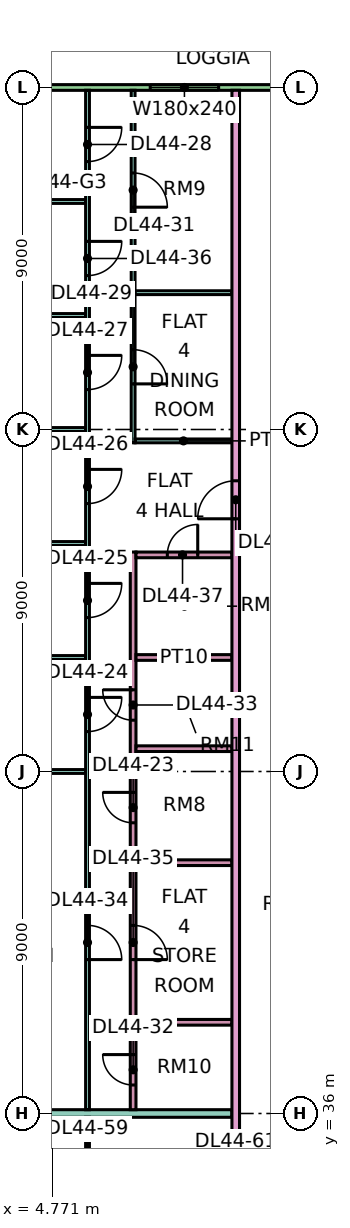
"""IFC4 building model, lengths in metres.
Left out: names, types, materials, properties, quantities, classifications, styles, units other than length and angle.
Written with IfcOpenShell. Run it as: python <this file> out.ifc"""

import sys

from ifc_helpers import new_model, si_unit, direction, frame, frame_2d, origin, place, context, subcontext, project, spatial, rectangle, extrude, element, fill, save


model = new_model("IFC4")
c1 = context("Model", 3, precision=1e-05, world=origin(), true_north=direction((0.0, 1.0)))
c2 = subcontext(c1, "Body", "Model", "MODEL_VIEW")
j1 = project(units=[si_unit("LENGTHUNIT", "METRE"), si_unit("PLANEANGLEUNIT", "RADIAN")], contexts=[c1])
p1 = place(None, origin())
s1 = spatial("IfcSite", under=j1, at=p1, CompositionType="ELEMENT")
p2 = place(p1, origin())
s2 = spatial("IfcBuilding", under=s1, at=p2, CompositionType="ELEMENT")
p3 = place(p2, frame((0.0, 0.0, 191.15)))
s3 = spatial("IfcBuildingStorey", under=s2, at=p3, CompositionType="ELEMENT", Elevation=191.15)
p4 = place(p3, frame((11.925, 63.0, 0.0), z_axis=(0.0, 0.0, 1.0), x_axis=(-1.0, 0.0, 0.0)))
e1 = element("IfcWall", 1, at=p4, inside=s3, PredefinedType="SOLIDWALL", context=c2, shape_type="SweptSolid", body=[
    extrude(rectangle(XDim=10.35, YDim=0.15, at=frame_2d((5.175, 0.0))), origin(), (0.0, 0.0, 1.0), 3.35),
])
p5 = place(p4, frame((2.775, 0.0, 0.45)))
e2 = element("IfcOpeningElement", 2, at=p5, cuts=e1, PredefinedType="OPENING", context=c2, shape_type="SweptSolid", body=[
    extrude(rectangle(XDim=1.8, YDim=2.4, at=frame_2d((0.9, 1.2))), frame((0.0, 0.085, 0.0), z_axis=(0.0, -1.0, 0.0), x_axis=(1.0, 0.0, 0.0)), (0.0, 0.0, 1.0), 0.17),
])
p6 = place(p4, frame((7.387, 0.0, 0.0)))
e3 = element("IfcOpeningElement", 3, at=p6, cuts=e1, PredefinedType="OPENING", context=c2, shape_type="SweptSolid", body=[
    extrude(rectangle(XDim=1.8, YDim=2.4, at=frame_2d((0.9, 1.2))), frame((0.0, 0.085, 0.0), z_axis=(0.0, -1.0, 0.0), x_axis=(1.0, 0.0, 0.0)), (0.0, 0.0, 1.0), 0.17),
])
p7 = place(p3, frame((0.0, 36.0, 0.0), z_axis=(0.0, 0.0, 1.0), x_axis=(1.0, 0.0, 0.0)))
e4 = element("IfcWall", 4, at=p7, inside=s3, PredefinedType="PARTITIONING", context=c2, shape_type="SweptSolid", body=[
    extrude(rectangle(XDim=9.5, YDim=0.2, at=frame_2d((4.75, 0.0))), origin(), (0.0, 0.0, 1.0), 3.35),
])
p8 = place(p3, frame((0.0, 45.0, 0.0), z_axis=(0.0, 0.0, 1.0), x_axis=(1.0, 0.0, 0.0)))
e5 = element("IfcWall", 5, at=p8, inside=s3, PredefinedType="PARTITIONING", context=c2, shape_type="SweptSolid", body=[
    extrude(rectangle(XDim=5.65, YDim=0.1, at=frame_2d((2.825, 0.0))), origin(), (0.0, 0.0, 1.0), 3.35),
])
p9 = place(p3, frame((0.0, 48.0, 0.0), z_axis=(0.0, 0.0, 1.0), x_axis=(1.0, 0.0, 0.0)))
e6 = element("IfcWall", 6, at=p9, inside=s3, PredefinedType="PARTITIONING", context=c2, shape_type="SweptSolid", body=[
    extrude(rectangle(XDim=5.65, YDim=0.1, at=frame_2d((2.825, 0.0))), origin(), (0.0, 0.0, 1.0), 3.35),
])
for number, where, z_axis, x_axis in (
    (7, (0.074, 51.0, 0.0), (0.0, 0.0, 1.0), (1.0, 0.0, 0.0)),
    (8, (0.074, 54.0, 0.0), (0.0, 0.0, 1.0), (1.0, 0.0, 0.0)),
    (9, (0.074, 57.0, 0.0), (0.0, 0.0, 1.0), (1.0, 0.0, 0.0)),
    (10, (0.074, 60.0, 0.0), (0.0, 0.0, 1.0), (1.0, 0.0, 0.0)),
):
    element("IfcWall", number, at=place(p3, frame(where, z_axis=z_axis, x_axis=x_axis)), inside=s3, PredefinedType="PARTITIONING", context=c2, shape_type="SweptSolid", body=[
        extrude(rectangle(XDim=5.576, YDim=0.1, at=frame_2d((2.788, 0.0))), origin(), (0.0, 0.0, 1.0), 3.35),
    ])
p10 = place(p3, frame((5.7, 29.95, 0.0), z_axis=(0.0, 0.0, 1.0), x_axis=(0.0, 1.0, 0.0)))
e11 = element("IfcWall", 11, at=p10, inside=s3, PredefinedType="PARTITIONING", context=c2, shape_type="SweptSolid", body=[
    extrude(rectangle(XDim=5.95, YDim=0.1, at=frame_2d((2.975, 0.0))), origin(), (0.0, 0.0, 1.0), 3.35),
])
p11 = place(p10, frame((1.1, 0.0, 0.0)))
e12 = element("IfcOpeningElement", 12, at=p11, cuts=e11, PredefinedType="OPENING", context=c2, shape_type="SweptSolid", body=[
    extrude(rectangle(XDim=0.9, YDim=2.1, at=frame_2d((0.45, 1.05))), frame((0.0, 0.06, 0.0), z_axis=(0.0, -1.0, 0.0), x_axis=(1.0, 0.0, 0.0)), (0.0, 0.0, 1.0), 0.12),
])
p12 = place(p10, frame((4.1, 0.0, 0.0)))
e13 = element("IfcOpeningElement", 13, at=p12, cuts=e11, PredefinedType="OPENING", context=c2, shape_type="SweptSolid", body=[
    extrude(rectangle(XDim=0.9, YDim=2.1, at=frame_2d((0.45, 1.05))), frame((0.0, 0.06, 0.0), z_axis=(0.0, -1.0, 0.0), x_axis=(1.0, 0.0, 0.0)), (0.0, 0.0, 1.0), 0.12),
])
p13 = place(p3, frame((5.7, 36.1, 0.0), z_axis=(0.0, 0.0, 1.0), x_axis=(0.0, 1.0, 0.0)))
e14 = element("IfcWall", 14, at=p13, inside=s3, PredefinedType="PARTITIONING", context=c2, shape_type="SweptSolid", body=[
    extrude(rectangle(XDim=26.826, YDim=0.1, at=frame_2d((13.413, 0.0))), origin(), (0.0, 0.0, 1.0), 3.35),
])
p14 = place(p13, frame((9.95, 0.0, 0.0)))
e15 = element("IfcOpeningElement", 15, at=p14, cuts=e14, PredefinedType="OPENING", context=c2, shape_type="SweptSolid", body=[
    extrude(rectangle(XDim=0.9, YDim=2.1, at=frame_2d((0.45, 1.05))), frame((0.0, 0.06, 0.0), z_axis=(0.0, -1.0, 0.0), x_axis=(1.0, 0.0, 0.0)), (0.0, 0.0, 1.0), 0.12),
])
p15 = place(p13, frame((12.95, 0.0, 0.0)))
e16 = element("IfcOpeningElement", 16, at=p15, cuts=e14, PredefinedType="OPENING", context=c2, shape_type="SweptSolid", body=[
    extrude(rectangle(XDim=0.9, YDim=2.1, at=frame_2d((0.45, 1.05))), frame((0.0, 0.06, 0.0), z_axis=(0.0, -1.0, 0.0), x_axis=(1.0, 0.0, 0.0)), (0.0, 0.0, 1.0), 0.12),
])
p16 = place(p13, frame((15.95, 0.0, 0.0)))
e17 = element("IfcOpeningElement", 17, at=p16, cuts=e14, PredefinedType="OPENING", context=c2, shape_type="SweptSolid", body=[
    extrude(rectangle(XDim=0.9, YDim=2.1, at=frame_2d((0.45, 1.05))), frame((0.0, 0.06, 0.0), z_axis=(0.0, -1.0, 0.0), x_axis=(1.0, 0.0, 0.0)), (0.0, 0.0, 1.0), 0.12),
])
p17 = place(p13, frame((18.95, 0.0, 0.0)))
e18 = element("IfcOpeningElement", 18, at=p17, cuts=e14, PredefinedType="OPENING", context=c2, shape_type="SweptSolid", body=[
    extrude(rectangle(XDim=0.9, YDim=2.1, at=frame_2d((0.45, 1.05))), frame((0.0, 0.06, 0.0), z_axis=(0.0, -1.0, 0.0), x_axis=(1.0, 0.0, 0.0)), (0.0, 0.0, 1.0), 0.12),
])
p18 = place(p13, frame((24.95, 0.0, 0.0)))
e19 = element("IfcOpeningElement", 19, at=p18, cuts=e14, PredefinedType="OPENING", context=c2, shape_type="SweptSolid", body=[
    extrude(rectangle(XDim=0.9, YDim=2.1, at=frame_2d((0.45, 1.05))), frame((0.0, 0.06, 0.0), z_axis=(0.0, -1.0, 0.0), x_axis=(1.0, 0.0, 0.0)), (0.0, 0.0, 1.0), 0.12),
])
p19 = place(p13, frame((3.95, 0.0, 0.0)))
e20 = element("IfcOpeningElement", 20, at=p19, cuts=e14, PredefinedType="OPENING", context=c2, shape_type="SweptSolid", body=[
    extrude(rectangle(XDim=0.9, YDim=2.1, at=frame_2d((0.45, 1.05))), frame((0.0, 0.06, 0.0), z_axis=(0.0, -1.0, 0.0), x_axis=(1.0, 0.0, 0.0)), (0.0, 0.0, 1.0), 0.12),
])
p20 = place(p13, frame((21.95, 0.0, 0.0)))
e21 = element("IfcOpeningElement", 21, at=p20, cuts=e14, PredefinedType="OPENING", context=c2, shape_type="SweptSolid", body=[
    extrude(rectangle(XDim=0.9, YDim=2.1, at=frame_2d((0.45, 1.05))), frame((0.0, 0.06, 0.0), z_axis=(0.0, -1.0, 0.0), x_axis=(1.0, 0.0, 0.0)), (0.0, 0.0, 1.0), 0.12),
])
p21 = place(p3, frame((6.9, 36.1, 0.0), z_axis=(0.0, 0.0, 1.0), x_axis=(0.0, 1.0, 0.0)))
e22 = element("IfcWall", 22, at=p21, inside=s3, PredefinedType="PARTITIONING", context=c2, shape_type="SweptSolid", body=[
    extrude(rectangle(XDim=14.675, YDim=0.15, at=frame_2d((7.337, 0.0))), origin(), (0.0, 0.0, 1.0), 3.35),
])
p22 = place(p21, frame((7.55, 0.0, 0.0)))
e23 = element("IfcOpeningElement", 23, at=p22, cuts=e22, PredefinedType="OPENING", context=c2, shape_type="SweptSolid", body=[
    extrude(rectangle(XDim=0.8, YDim=2.1, at=frame_2d((0.4, 1.05))), frame((0.0, 0.085, 0.0), z_axis=(0.0, -1.0, 0.0), x_axis=(1.0, 0.0, 0.0)), (0.0, 0.0, 1.0), 0.17),
])
p23 = place(p21, frame((0.65, 0.0, 0.0)))
e24 = element("IfcOpeningElement", 24, at=p23, cuts=e22, PredefinedType="OPENING", context=c2, shape_type="SweptSolid", body=[
    extrude(rectangle(XDim=0.8, YDim=2.1, at=frame_2d((0.4, 1.05))), frame((0.0, 0.085, 0.0), z_axis=(0.0, -1.0, 0.0), x_axis=(1.0, 0.0, 0.0)), (0.0, 0.0, 1.0), 0.17),
])
p24 = place(p21, frame((10.25, 0.0, 0.0)))
e25 = element("IfcOpeningElement", 25, at=p24, cuts=e22, PredefinedType="OPENING", context=c2, shape_type="SweptSolid", body=[
    extrude(rectangle(XDim=0.8, YDim=2.1, at=frame_2d((0.4, 1.05))), frame((0.0, 0.085, 0.0), z_axis=(0.0, -1.0, 0.0), x_axis=(1.0, 0.0, 0.0)), (0.0, 0.0, 1.0), 0.17),
])
p25 = place(p21, frame((3.95, 0.0, 0.0)))
e26 = element("IfcOpeningElement", 26, at=p25, cuts=e22, PredefinedType="OPENING", context=c2, shape_type="SweptSolid", body=[
    extrude(rectangle(XDim=0.9, YDim=2.1, at=frame_2d((0.45, 1.05))), frame((0.0, 0.085, 0.0), z_axis=(0.0, -1.0, 0.0), x_axis=(1.0, 0.0, 0.0)), (0.0, 0.0, 1.0), 0.17),
])
p26 = place(p3, frame((6.9, 53.65, 0.0), z_axis=(0.0, 0.0, 1.0), x_axis=(0.0, 1.0, 0.0)))
e27 = element("IfcWall", 27, at=p26, inside=s3, PredefinedType="PARTITIONING", context=c2, shape_type="SweptSolid", body=[
    extrude(rectangle(XDim=9.276, YDim=0.1, at=frame_2d((4.638, 0.0))), origin(), (0.0, 0.0, 1.0), 3.35),
])
p27 = place(p26, frame((1.55, 0.0, 0.0)))
e28 = element("IfcOpeningElement", 28, at=p27, cuts=e27, PredefinedType="OPENING", context=c2, shape_type="SweptSolid", body=[
    extrude(rectangle(XDim=0.9, YDim=2.1, at=frame_2d((0.45, 1.05))), frame((0.0, 0.06, 0.0), z_axis=(0.0, -1.0, 0.0), x_axis=(1.0, 0.0, 0.0)), (0.0, 0.0, 1.0), 0.12),
])
p28 = place(p26, frame((6.2, 0.0, 0.0)))
e29 = element("IfcOpeningElement", 29, at=p28, cuts=e27, PredefinedType="OPENING", context=c2, shape_type="SweptSolid", body=[
    extrude(rectangle(XDim=0.9, YDim=2.1, at=frame_2d((0.45, 1.05))), frame((0.0, 0.06, 0.0), z_axis=(0.0, -1.0, 0.0), x_axis=(1.0, 0.0, 0.0)), (0.0, 0.0, 1.0), 0.12),
])
for number, where, z_axis, x_axis in (
    (30, (6.95, 53.7, 0.0), (0.0, 0.0, 1.0), (1.0, 0.0, 0.0)),
    (31, (6.95, 57.6, 0.0), (0.0, 0.0, 1.0), (1.0, 0.0, 0.0)),
):
    element("IfcWall", number, at=place(p3, frame(where, z_axis=z_axis, x_axis=x_axis)), inside=s3, PredefinedType="PARTITIONING", context=c2, shape_type="SweptSolid", body=[
        extrude(rectangle(XDim=2.55, YDim=0.1, at=frame_2d((1.275, 0.0))), origin(), (0.0, 0.0, 1.0), 3.35),
    ])
for number, where, z_axis, x_axis in (
    (32, (6.975, 38.4, 0.0), (0.0, 0.0, 1.0), (1.0, 0.0, 0.0)),
    (33, (6.975, 42.6, 0.0), (0.0, 0.0, 1.0), (1.0, 0.0, 0.0)),
    (34, (6.975, 45.6, 0.0), (0.0, 0.0, 1.0), (1.0, 0.0, 0.0)),
    (35, (6.975, 48.0, 0.0), (0.0, 0.0, 1.0), (1.0, 0.0, 0.0)),
):
    element("IfcWall", number, at=place(p3, frame(where, z_axis=z_axis, x_axis=x_axis)), inside=s3, PredefinedType="PARTITIONING", context=c2, shape_type="SweptSolid", body=[
        extrude(rectangle(XDim=2.525, YDim=0.15, at=frame_2d((1.262, 0.0))), origin(), (0.0, 0.0, 1.0), 3.35),
    ])
p29 = place(p3, frame((6.975, 50.7, 0.0), z_axis=(0.0, 0.0, 1.0), x_axis=(1.0, 0.0, 0.0)))
e36 = element("IfcWall", 36, at=p29, inside=s3, PredefinedType="PARTITIONING", context=c2, shape_type="SweptSolid", body=[
    extrude(rectangle(XDim=2.525, YDim=0.15, at=frame_2d((1.262, 0.0))), origin(), (0.0, 0.0, 1.0), 3.35),
])
p30 = place(p29, frame((0.825, 0.0, 0.0)))
e37 = element("IfcOpeningElement", 37, at=p30, cuts=e36, PredefinedType="OPENING", context=c2, shape_type="SweptSolid", body=[
    extrude(rectangle(XDim=0.8, YDim=2.1, at=frame_2d((0.4, 1.05))), frame((0.0, 0.085, 0.0), z_axis=(0.0, -1.0, 0.0), x_axis=(1.0, 0.0, 0.0)), (0.0, 0.0, 1.0), 0.17),
])
p31 = place(p3, frame((9.6, 20.0, 0.0), z_axis=(0.0, 0.0, 1.0), x_axis=(0.0, 1.0, 0.0)))
e38 = element("IfcWall", 38, at=p31, inside=s3, PredefinedType="PARTITIONING", context=c2, shape_type="SweptSolid", body=[
    extrude(rectangle(XDim=42.926, YDim=0.2, at=frame_2d((21.463, 0.0))), origin(), (0.0, 0.0, 1.0), 3.35),
])
p32 = place(p31, frame((31.65, 0.0, 0.0)))
e39 = element("IfcOpeningElement", 39, at=p32, cuts=e38, PredefinedType="OPENING", context=c2, shape_type="SweptSolid", body=[
    extrude(rectangle(XDim=1.0, YDim=2.1, at=frame_2d((0.5, 1.05))), frame((0.0, 0.11, 0.0), z_axis=(0.0, -1.0, 0.0), x_axis=(1.0, 0.0, 0.0)), (0.0, 0.0, 1.0), 0.22),
])
p33 = place(p31, frame((0.6, 0.0, 0.0)))
e40 = element("IfcOpeningElement", 40, at=p33, cuts=e38, PredefinedType="OPENING", context=c2, shape_type="SweptSolid", body=[
    extrude(rectangle(XDim=1.2, YDim=2.1, at=frame_2d((0.6, 1.05))), frame((0.0, 0.11, 0.0), z_axis=(0.0, -1.0, 0.0), x_axis=(1.0, 0.0, 0.0)), (0.0, 0.0, 1.0), 0.22),
])
p34 = place(p31, frame((13.65, 0.0, 0.0)))
e41 = element("IfcOpeningElement", 41, at=p34, cuts=e38, PredefinedType="OPENING", context=c2, shape_type="SweptSolid", body=[
    extrude(rectangle(XDim=1.0, YDim=2.1, at=frame_2d((0.5, 1.05))), frame((0.0, 0.11, 0.0), z_axis=(0.0, -1.0, 0.0), x_axis=(1.0, 0.0, 0.0)), (0.0, 0.0, 1.0), 0.22),
])
p35 = place(p5, origin())
e42 = element("IfcWindow", 42, at=p35, inside=s3, PartitioningType="SINGLE_PANEL", PredefinedType="WINDOW", context=c2, shape_type="SweptSolid", body=[
    extrude(rectangle(XDim=1.8, YDim=2.4, at=frame_2d((0.9, 1.2))), frame((0.0, 0.03, 0.0), z_axis=(0.0, -1.0, 0.0), x_axis=(1.0, 0.0, 0.0)), (0.0, 0.0, 1.0), 0.06),
])
fill(e2, e42)
p36 = place(p22, frame((0.8, 0.0, 0.0), z_axis=(0.0, 0.0, 1.0), x_axis=(-1.0, 0.0, 0.0)))
e43 = element("IfcDoor", 43, at=p36, inside=s3, OperationType="SINGLE_SWING_RIGHT", PredefinedType="DOOR", context=c2, shape_type="SweptSolid", body=[
    extrude(rectangle(XDim=0.8, YDim=2.1, at=frame_2d((0.4, 1.05))), frame((0.0, 0.025, 0.0), z_axis=(0.0, -1.0, 0.0), x_axis=(1.0, 0.0, 0.0)), (0.0, 0.0, 1.0), 0.05),
])
fill(e23, e43)
p37 = place(p14, origin())
e44 = element("IfcDoor", 44, at=p37, inside=s3, OperationType="SINGLE_SWING_RIGHT", PredefinedType="DOOR", context=c2, shape_type="SweptSolid", body=[
    extrude(rectangle(XDim=0.9, YDim=2.1, at=frame_2d((0.45, 1.05))), frame((0.0, 0.025, 0.0), z_axis=(0.0, -1.0, 0.0), x_axis=(1.0, 0.0, 0.0)), (0.0, 0.0, 1.0), 0.05),
])
fill(e15, e44)
p38 = place(p15, origin())
e45 = element("IfcDoor", 45, at=p38, inside=s3, OperationType="SINGLE_SWING_RIGHT", PredefinedType="DOOR", context=c2, shape_type="SweptSolid", body=[
    extrude(rectangle(XDim=0.9, YDim=2.1, at=frame_2d((0.45, 1.05))), frame((0.0, 0.025, 0.0), z_axis=(0.0, -1.0, 0.0), x_axis=(1.0, 0.0, 0.0)), (0.0, 0.0, 1.0), 0.05),
])
fill(e16, e45)
p39 = place(p16, origin())
e46 = element("IfcDoor", 46, at=p39, inside=s3, OperationType="SINGLE_SWING_RIGHT", PredefinedType="DOOR", context=c2, shape_type="SweptSolid", body=[
    extrude(rectangle(XDim=0.9, YDim=2.1, at=frame_2d((0.45, 1.05))), frame((0.0, 0.025, 0.0), z_axis=(0.0, -1.0, 0.0), x_axis=(1.0, 0.0, 0.0)), (0.0, 0.0, 1.0), 0.05),
])
fill(e17, e46)
p40 = place(p17, origin())
e47 = element("IfcDoor", 47, at=p40, inside=s3, OperationType="SINGLE_SWING_RIGHT", PredefinedType="DOOR", context=c2, shape_type="SweptSolid", body=[
    extrude(rectangle(XDim=0.9, YDim=2.1, at=frame_2d((0.45, 1.05))), frame((0.0, 0.025, 0.0), z_axis=(0.0, -1.0, 0.0), x_axis=(1.0, 0.0, 0.0)), (0.0, 0.0, 1.0), 0.05),
])
fill(e18, e47)
p41 = place(p18, origin())
e48 = element("IfcDoor", 48, at=p41, inside=s3, OperationType="SINGLE_SWING_RIGHT", PredefinedType="DOOR", context=c2, shape_type="SweptSolid", body=[
    extrude(rectangle(XDim=0.9, YDim=2.1, at=frame_2d((0.45, 1.05))), frame((0.0, 0.025, 0.0), z_axis=(0.0, -1.0, 0.0), x_axis=(1.0, 0.0, 0.0)), (0.0, 0.0, 1.0), 0.05),
])
fill(e19, e48)
p42 = place(p27, frame((0.9, 0.0, 0.0), z_axis=(0.0, 0.0, 1.0), x_axis=(-1.0, 0.0, 0.0)))
e49 = element("IfcDoor", 49, at=p42, inside=s3, OperationType="SINGLE_SWING_LEFT", PredefinedType="DOOR", context=c2, shape_type="SweptSolid", body=[
    extrude(rectangle(XDim=0.9, YDim=2.1, at=frame_2d((0.45, 1.05))), frame((0.0, 0.025, 0.0), z_axis=(0.0, -1.0, 0.0), x_axis=(1.0, 0.0, 0.0)), (0.0, 0.0, 1.0), 0.05),
])
fill(e28, e49)
p43 = place(p32, origin())
e50 = element("IfcDoor", 50, at=p43, inside=s3, OperationType="SINGLE_SWING_LEFT", PredefinedType="DOOR", context=c2, shape_type="SweptSolid", body=[
    extrude(rectangle(XDim=1.0, YDim=2.1, at=frame_2d((0.5, 1.05))), frame((0.0, 0.025, 0.0), z_axis=(0.0, -1.0, 0.0), x_axis=(1.0, 0.0, 0.0)), (0.0, 0.0, 1.0), 0.05),
])
fill(e39, e50)
p44 = place(p28, frame((0.9, 0.0, 0.0), z_axis=(0.0, 0.0, 1.0), x_axis=(-1.0, 0.0, 0.0)))
e51 = element("IfcDoor", 51, at=p44, inside=s3, OperationType="SINGLE_SWING_LEFT", PredefinedType="DOOR", context=c2, shape_type="SweptSolid", body=[
    extrude(rectangle(XDim=0.9, YDim=2.1, at=frame_2d((0.45, 1.05))), frame((0.0, 0.025, 0.0), z_axis=(0.0, -1.0, 0.0), x_axis=(1.0, 0.0, 0.0)), (0.0, 0.0, 1.0), 0.05),
])
fill(e29, e51)
p45 = place(p23, frame((0.8, 0.0, 0.0), z_axis=(0.0, 0.0, 1.0), x_axis=(-1.0, 0.0, 0.0)))
e52 = element("IfcDoor", 52, at=p45, inside=s3, OperationType="SINGLE_SWING_RIGHT", PredefinedType="DOOR", context=c2, shape_type="SweptSolid", body=[
    extrude(rectangle(XDim=0.8, YDim=2.1, at=frame_2d((0.4, 1.05))), frame((0.0, 0.025, 0.0), z_axis=(0.0, -1.0, 0.0), x_axis=(1.0, 0.0, 0.0)), (0.0, 0.0, 1.0), 0.05),
])
fill(e24, e52)
p46 = place(p24, frame((0.8, 0.0, 0.0), z_axis=(0.0, 0.0, 1.0), x_axis=(-1.0, 0.0, 0.0)))
e53 = element("IfcDoor", 53, at=p46, inside=s3, OperationType="SINGLE_SWING_RIGHT", PredefinedType="DOOR", context=c2, shape_type="SweptSolid", body=[
    extrude(rectangle(XDim=0.8, YDim=2.1, at=frame_2d((0.4, 1.05))), frame((0.0, 0.025, 0.0), z_axis=(0.0, -1.0, 0.0), x_axis=(1.0, 0.0, 0.0)), (0.0, 0.0, 1.0), 0.05),
])
fill(e25, e53)
p47 = place(p19, frame((0.9, 0.0, 0.0), z_axis=(0.0, 0.0, 1.0), x_axis=(-1.0, 0.0, 0.0)))
e54 = element("IfcDoor", 54, at=p47, inside=s3, OperationType="SINGLE_SWING_LEFT", PredefinedType="DOOR", context=c2, shape_type="SweptSolid", body=[
    extrude(rectangle(XDim=0.9, YDim=2.1, at=frame_2d((0.45, 1.05))), frame((0.0, 0.025, 0.0), z_axis=(0.0, -1.0, 0.0), x_axis=(1.0, 0.0, 0.0)), (0.0, 0.0, 1.0), 0.05),
])
fill(e20, e54)
p48 = place(p25, frame((0.9, 0.0, 0.0), z_axis=(0.0, 0.0, 1.0), x_axis=(-1.0, 0.0, 0.0)))
e55 = element("IfcDoor", 55, at=p48, inside=s3, OperationType="SINGLE_SWING_LEFT", PredefinedType="DOOR", context=c2, shape_type="SweptSolid", body=[
    extrude(rectangle(XDim=0.9, YDim=2.1, at=frame_2d((0.45, 1.05))), frame((0.0, 0.025, 0.0), z_axis=(0.0, -1.0, 0.0), x_axis=(1.0, 0.0, 0.0)), (0.0, 0.0, 1.0), 0.05),
])
fill(e26, e55)
p49 = place(p20, origin())
e56 = element("IfcDoor", 56, at=p49, inside=s3, OperationType="SINGLE_SWING_RIGHT", PredefinedType="DOOR", context=c2, shape_type="SweptSolid", body=[
    extrude(rectangle(XDim=0.9, YDim=2.1, at=frame_2d((0.45, 1.05))), frame((0.0, 0.025, 0.0), z_axis=(0.0, -1.0, 0.0), x_axis=(1.0, 0.0, 0.0)), (0.0, 0.0, 1.0), 0.05),
])
fill(e21, e56)
p50 = place(p30, frame((0.8, 0.0, 0.0), z_axis=(0.0, 0.0, 1.0), x_axis=(-1.0, 0.0, 0.0)))
e57 = element("IfcDoor", 57, at=p50, inside=s3, OperationType="SINGLE_SWING_RIGHT", PredefinedType="DOOR", context=c2, shape_type="SweptSolid", body=[
    extrude(rectangle(XDim=0.8, YDim=2.1, at=frame_2d((0.4, 1.05))), frame((0.0, 0.025, 0.0), z_axis=(0.0, -1.0, 0.0), x_axis=(1.0, 0.0, 0.0)), (0.0, 0.0, 1.0), 0.05),
])
fill(e37, e57)
save(model, sys.argv[1])
